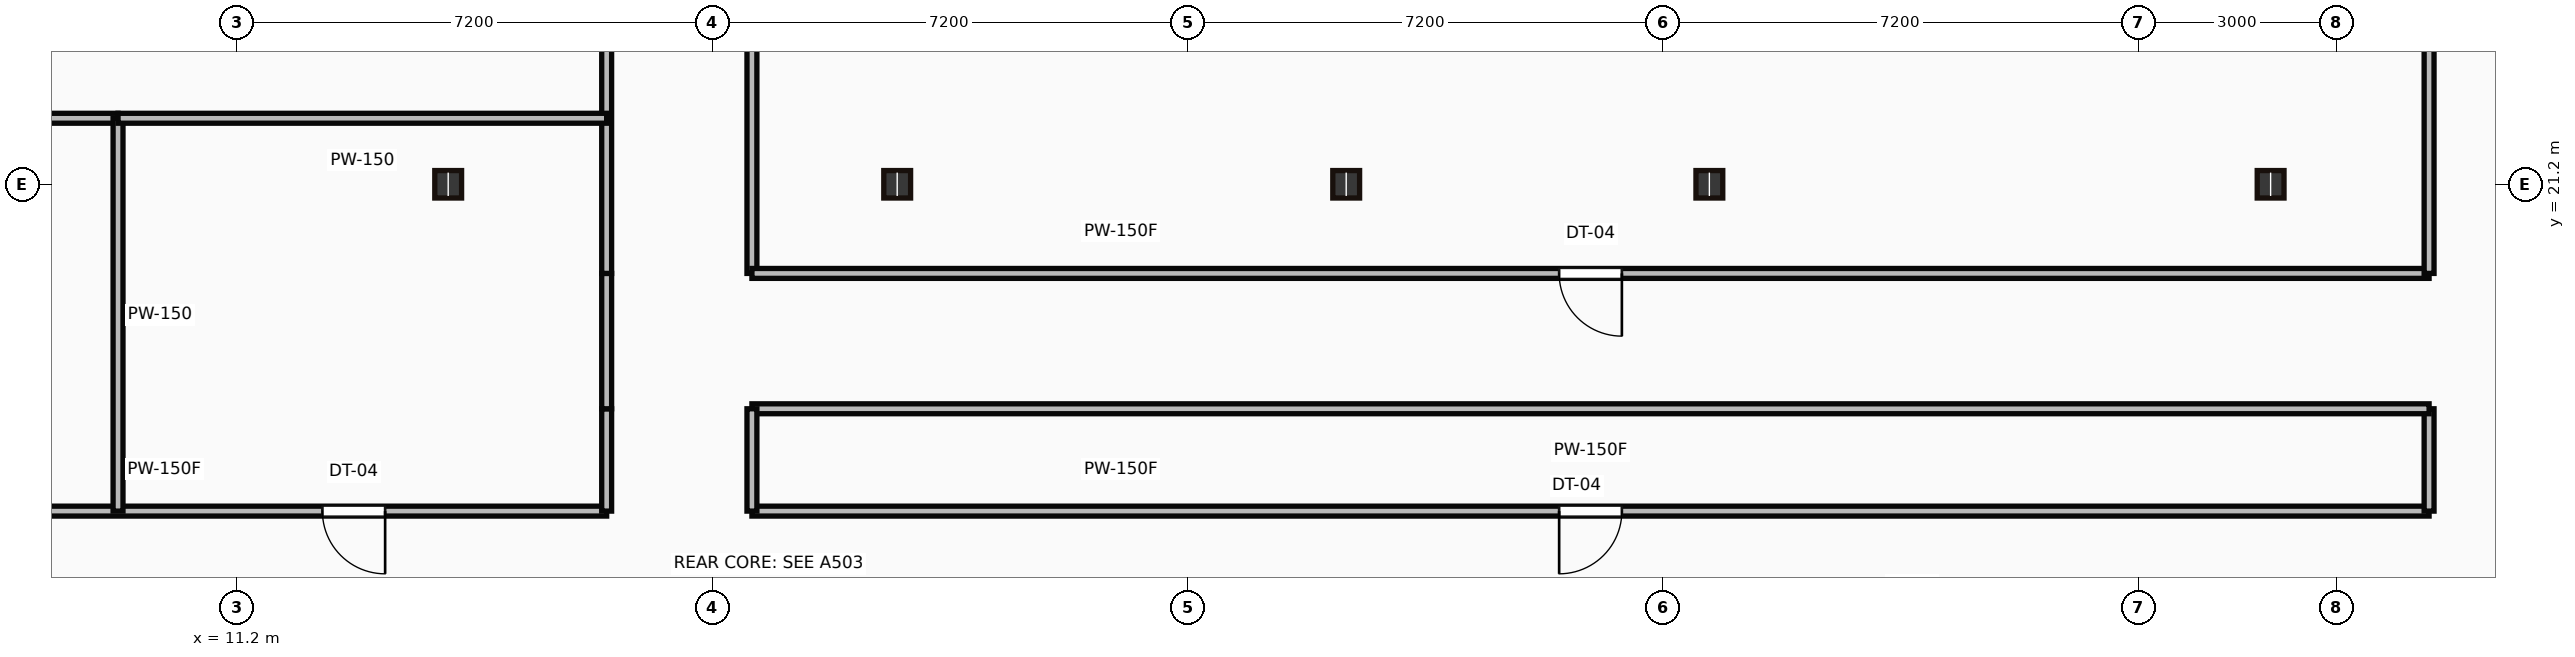
"""IFC4 building model, lengths in metres.
Left out: names, types, materials, properties, quantities, classifications, styles, units other than length and angle.
Written with IfcOpenShell. Run it as: python <this file> out.ifc"""

import sys

from ifc_helpers import new_model, si_unit, direction, frame, frame_2d, origin, origin_2d, place, context, subcontext, project, spatial, rectangle, i_section, extrude, source, transform, mapped, element, fill, save


model = new_model("IFC4")
c1 = context("Model", 3, precision=1e-05, world=origin(), true_north=direction((0.0, 1.0)))
c2 = subcontext(c1, "Body", "Model", "MODEL_VIEW")
j1 = project(units=[si_unit("LENGTHUNIT", "METRE"), si_unit("PLANEANGLEUNIT", "RADIAN")], contexts=[c1])
p1 = place(None, origin())
s1 = spatial("IfcSite", under=j1, at=p1, CompositionType="ELEMENT")
p2 = place(p1, origin())
s2 = spatial("IfcBuilding", under=s1, at=p2, CompositionType="ELEMENT")
p3 = place(p2, frame((0.0, 0.0, 58.05)))
s3 = spatial("IfcBuildingStorey", under=s2, at=p3, CompositionType="ELEMENT", Elevation=58.05)
m1 = source(origin(), c2, "Body", "SweptSolid", [
    extrude(i_section(OverallWidth=0.406, OverallDepth=0.416, WebThickness=0.03, FlangeThickness=0.048, at=origin_2d()), origin(), (0.0, 0.0, 1.0), 3.65),
])
for number, where, z_axis, x_axis in (
    (1, (14.4, 21.2, 0.0), (0.0, 0.0, 1.0), (1.0, 0.0, 0.0)),
    (2, (21.2, 21.2, 0.0), (0.0, 0.0, 1.0), (1.0, 0.0, 0.0)),
    (3, (28.0, 21.2, 0.0), (0.0, 0.0, 1.0), (1.0, 0.0, 0.0)),
    (4, (33.5, 21.2, 0.0), (0.0, 0.0, 1.0), (1.0, 0.0, 0.0)),
    (5, (42.0, 21.2, 0.0), (0.0, 0.0, 1.0), (1.0, 0.0, 0.0)),
):
    element("IfcColumn", number, at=place(p3, frame(where, z_axis=z_axis, x_axis=x_axis)), inside=s3, PredefinedType="COLUMN", context=c2, shape_type="MappedRepresentation", body=[
        mapped(m1, transform((0.0, 0.0, 0.0))),
    ])
m2 = source(origin(), c2, "Body", "SweptSolid", [
    extrude(rectangle(XDim=13.4, YDim=0.15, at=frame_2d((6.7, 0.0))), origin(), (0.0, 0.0, 1.0), 3.4),
])
p4 = place(p3, frame((3.4, 16.25, 0.0), z_axis=(0.0, 0.0, 1.0), x_axis=(1.0, 0.0, 0.0)))
e6 = element("IfcWall", 6, at=p4, inside=s3, PredefinedType="PARTITIONING", context=c2, shape_type="MappedRepresentation", body=[
    mapped(m2, transform((0.0, 0.0, 0.0))),
])
p5 = place(p4, frame((2.655, 0.0, 0.0)))
e7 = element("IfcOpeningElement", 7, at=p5, cuts=e6, PredefinedType="OPENING", context=c2, shape_type="SweptSolid", body=[
    extrude(rectangle(XDim=0.95, YDim=2.15, at=frame_2d((0.475, 1.075))), frame((0.0, 0.085, 0.0), z_axis=(0.0, -1.0, 0.0), x_axis=(1.0, 0.0, 0.0)), (0.0, 0.0, 1.0), 0.17),
])
p6 = place(p4, frame((9.095, 0.0, 0.0)))
e8 = element("IfcOpeningElement", 8, at=p6, cuts=e6, PredefinedType="OPENING", context=c2, shape_type="SweptSolid", body=[
    extrude(rectangle(XDim=0.95, YDim=2.15, at=frame_2d((0.475, 1.075))), frame((0.0, 0.085, 0.0), z_axis=(0.0, -1.0, 0.0), x_axis=(1.0, 0.0, 0.0)), (0.0, 0.0, 1.0), 0.17),
])
m3 = source(origin(), c2, "Body", "SweptSolid", [
    extrude(rectangle(XDim=1.55, YDim=0.15, at=frame_2d((0.775, 0.0))), origin(), (0.0, 0.0, 1.0), 3.4),
])
p7 = place(p3, frame((16.8, 16.25, 0.0), z_axis=(0.0, 0.0, 1.0), x_axis=(0.0, 1.0, 0.0)))
e9 = element("IfcWall", 9, at=p7, inside=s3, PredefinedType="PARTITIONING", context=c2, shape_type="MappedRepresentation", body=[
    mapped(m3, transform((0.0, 0.0, 0.0))),
])
m4 = source(origin(), c2, "Body", "SweptSolid", [
    extrude(rectangle(XDim=2.05, YDim=0.15, at=frame_2d((1.025, 0.0))), origin(), (0.0, 0.0, 1.0), 3.4),
])
p8 = place(p3, frame((16.8, 17.8, 0.0), z_axis=(0.0, 0.0, 1.0), x_axis=(0.0, 1.0, 0.0)))
e10 = element("IfcWall", 10, at=p8, inside=s3, PredefinedType="PARTITIONING", context=c2, shape_type="MappedRepresentation", body=[
    mapped(m4, transform((0.0, 0.0, 0.0))),
])
m5 = source(origin(), c2, "Body", "SweptSolid", [
    extrude(rectangle(XDim=16.15, YDim=0.15, at=frame_2d((8.075, 0.0))), origin(), (0.0, 0.0, 1.0), 3.4),
])
p9 = place(p3, frame((16.8, 19.85, 0.0), z_axis=(0.0, 0.0, 1.0), x_axis=(0.0, 1.0, 0.0)))
e11 = element("IfcWall", 11, at=p9, inside=s3, PredefinedType="PARTITIONING", context=c2, shape_type="MappedRepresentation", body=[
    mapped(m5, transform((0.0, 0.0, 0.0))),
])
p10 = place(p9, frame((7.075, 0.0, 0.0)))
e12 = element("IfcOpeningElement", 12, at=p10, cuts=e11, PredefinedType="OPENING", context=c2, shape_type="SweptSolid", body=[
    extrude(rectangle(XDim=0.95, YDim=2.15, at=frame_2d((0.475, 1.075))), frame((0.0, 0.085, 0.0), z_axis=(0.0, -1.0, 0.0), x_axis=(1.0, 0.0, 0.0)), (0.0, 0.0, 1.0), 0.17),
])
p11 = place(p9, frame((13.845, 0.0, 0.0)))
e13 = element("IfcOpeningElement", 13, at=p11, cuts=e11, PredefinedType="OPENING", context=c2, shape_type="SweptSolid", body=[
    extrude(rectangle(XDim=0.95, YDim=2.15, at=frame_2d((0.475, 1.075))), frame((0.0, 0.085, 0.0), z_axis=(0.0, -1.0, 0.0), x_axis=(1.0, 0.0, 0.0)), (0.0, 0.0, 1.0), 0.17),
])
p12 = place(p3, frame((19.0, 36.0, 0.0), z_axis=(0.0, 0.0, 1.0), x_axis=(0.0, -1.0, 0.0)))
e14 = element("IfcWall", 14, at=p12, inside=s3, PredefinedType="PARTITIONING", context=c2, shape_type="MappedRepresentation", body=[
    mapped(m5, transform((0.0, 0.0, 0.0))),
])
p13 = place(p12, frame((1.355, 0.0, 0.0)))
e15 = element("IfcOpeningElement", 15, at=p13, cuts=e14, PredefinedType="OPENING", context=c2, shape_type="SweptSolid", body=[
    extrude(rectangle(XDim=0.95, YDim=2.15, at=frame_2d((0.475, 1.075))), frame((0.0, 0.085, 0.0), z_axis=(0.0, -1.0, 0.0), x_axis=(1.0, 0.0, 0.0)), (0.0, 0.0, 1.0), 0.17),
])
m6 = source(origin(), c2, "Body", "SweptSolid", [
    extrude(rectangle(XDim=25.4, YDim=0.15, at=frame_2d((12.7, 0.0))), origin(), (0.0, 0.0, 1.0), 3.4),
])
p14 = place(p3, frame((19.0, 19.85, 0.0), z_axis=(0.0, 0.0, 1.0), x_axis=(1.0, 0.0, 0.0)))
e16 = element("IfcWall", 16, at=p14, inside=s3, PredefinedType="PARTITIONING", context=c2, shape_type="MappedRepresentation", body=[
    mapped(m6, transform((0.0, 0.0, 0.0))),
])
p15 = place(p14, frame((12.225, 0.0, 0.0)))
e17 = element("IfcOpeningElement", 17, at=p15, cuts=e16, PredefinedType="OPENING", context=c2, shape_type="SweptSolid", body=[
    extrude(rectangle(XDim=0.95, YDim=2.15, at=frame_2d((0.475, 1.075))), frame((0.0, 0.085, 0.0), z_axis=(0.0, -1.0, 0.0), x_axis=(1.0, 0.0, 0.0)), (0.0, 0.0, 1.0), 0.17),
])
m7 = source(origin(), c2, "Body", "SweptSolid", [
    extrude(rectangle(XDim=15.15, YDim=0.15, at=frame_2d((7.575, 0.0))), origin(), (0.0, 0.0, 1.0), 3.4),
])
p16 = place(p3, frame((44.4, 19.85, 0.0), z_axis=(0.0, 0.0, 1.0), x_axis=(0.0, 1.0, 0.0)))
e18 = element("IfcWall", 18, at=p16, inside=s3, PredefinedType="PARTITIONING", context=c2, shape_type="MappedRepresentation", body=[
    mapped(m7, transform((0.0, 0.0, 0.0))),
])
p17 = place(p3, frame((19.0, 16.25, 0.0), z_axis=(0.0, 0.0, 1.0), x_axis=(1.0, 0.0, 0.0)))
e19 = element("IfcWall", 19, at=p17, inside=s3, PredefinedType="PARTITIONING", context=c2, shape_type="MappedRepresentation", body=[
    mapped(m6, transform((0.0, 0.0, 0.0))),
])
p18 = place(p17, frame((12.225, 0.0, 0.0)))
e20 = element("IfcOpeningElement", 20, at=p18, cuts=e19, PredefinedType="OPENING", context=c2, shape_type="SweptSolid", body=[
    extrude(rectangle(XDim=0.95, YDim=2.15, at=frame_2d((0.475, 1.075))), frame((0.0, 0.085, 0.0), z_axis=(0.0, -1.0, 0.0), x_axis=(1.0, 0.0, 0.0)), (0.0, 0.0, 1.0), 0.17),
])
p19 = place(p3, frame((44.4, 16.25, 0.0), z_axis=(0.0, 0.0, 1.0), x_axis=(0.0, 1.0, 0.0)))
e21 = element("IfcWall", 21, at=p19, inside=s3, PredefinedType="PARTITIONING", context=c2, shape_type="MappedRepresentation", body=[
    mapped(m3, transform((0.0, 0.0, 0.0))),
])
p20 = place(p3, frame((44.4, 17.8, 0.0), z_axis=(0.0, 0.0, 1.0), x_axis=(-1.0, 0.0, 0.0)))
e22 = element("IfcWall", 22, at=p20, inside=s3, PredefinedType="PARTITIONING", context=c2, shape_type="MappedRepresentation", body=[
    mapped(m6, transform((0.0, 0.0, 0.0))),
])
p21 = place(p3, frame((19.0, 17.8, 0.0), z_axis=(0.0, 0.0, 1.0), x_axis=(0.0, -1.0, 0.0)))
e23 = element("IfcWall", 23, at=p21, inside=s3, PredefinedType="PARTITIONING", context=c2, shape_type="MappedRepresentation", body=[
    mapped(m3, transform((0.0, 0.0, 0.0))),
])
m8 = source(origin(), c2, "Body", "SweptSolid", [
    extrude(rectangle(XDim=9.38, YDim=0.15, at=frame_2d((4.69, 0.0))), origin(), (0.0, 0.0, 1.0), 3.4),
])
p22 = place(p3, frame((0.02, 22.2, 0.0), z_axis=(0.0, 0.0, 1.0), x_axis=(1.0, 0.0, 0.0)))
e24 = element("IfcWall", 24, at=p22, inside=s3, PredefinedType="PARTITIONING", context=c2, shape_type="MappedRepresentation", body=[
    mapped(m8, transform((0.0, 0.0, 0.0))),
])
m9 = source(origin(), c2, "Body", "SweptSolid", [
    extrude(rectangle(XDim=5.95, YDim=0.15, at=frame_2d((2.975, 0.0))), origin(), (0.0, 0.0, 1.0), 3.4),
])
p23 = place(p3, frame((9.4, 22.2, 0.0), z_axis=(0.0, 0.0, 1.0), x_axis=(0.0, -1.0, 0.0)))
e25 = element("IfcWall", 25, at=p23, inside=s3, PredefinedType="PARTITIONING", context=c2, shape_type="MappedRepresentation", body=[
    mapped(m9, transform((0.0, 0.0, 0.0))),
])
m10 = source(origin(), c2, "Body", "SweptSolid", [
    extrude(rectangle(XDim=7.4, YDim=0.15, at=frame_2d((3.7, 0.0))), origin(), (0.0, 0.0, 1.0), 3.4),
])
p24 = place(p3, frame((16.8, 22.2, 0.0), z_axis=(0.0, 0.0, 1.0), x_axis=(-1.0, 0.0, 0.0)))
e26 = element("IfcWall", 26, at=p24, inside=s3, PredefinedType="PARTITIONING", context=c2, shape_type="MappedRepresentation", body=[
    mapped(m10, transform((0.0, 0.0, 0.0))),
])
m11 = source(origin(), c2, "Body", "SweptSolid", [
    extrude(rectangle(XDim=0.95, YDim=2.15, at=frame_2d((0.475, 1.075))), frame((0.0, 0.025, 0.0), z_axis=(0.0, -1.0, 0.0), x_axis=(1.0, 0.0, 0.0)), (0.0, 0.0, 1.0), 0.05),
])
p25 = place(p6, origin())
e27 = element("IfcDoor", 27, at=p25, inside=s3, OperationType="SINGLE_SWING_RIGHT", PredefinedType="DOOR", context=c2, shape_type="MappedRepresentation", body=[
    mapped(m11, transform((0.0, 0.0, 0.0))),
])
fill(e8, e27)
p26 = place(p18, origin())
e28 = element("IfcDoor", 28, at=p26, inside=s3, OperationType="SINGLE_SWING_LEFT", PredefinedType="DOOR", context=c2, shape_type="MappedRepresentation", body=[
    mapped(m11, transform((0.0, 0.0, 0.0))),
])
fill(e20, e28)
p27 = place(p15, origin())
e29 = element("IfcDoor", 29, at=p27, inside=s3, OperationType="SINGLE_SWING_RIGHT", PredefinedType="DOOR", context=c2, shape_type="MappedRepresentation", body=[
    mapped(m11, transform((0.0, 0.0, 0.0))),
])
fill(e17, e29)
save(model, sys.argv[1])
